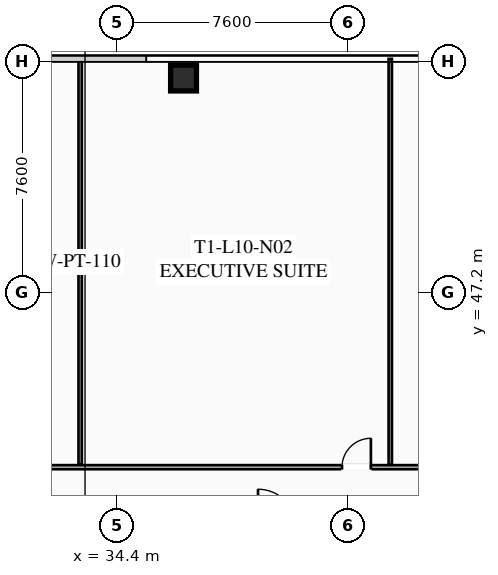
"""IFC4 building model, lengths in metres.
Left out: names, types, materials, properties, quantities, classifications, styles, units other than length and angle.
Written with IfcOpenShell. Run it as: python <this file> out.ifc"""

import sys

from ifc_helpers import new_model, si_unit, direction, frame, frame_2d, origin, origin_2d, place, context, subcontext, project, spatial, rectangle, hollow_rectangle, extrude, element, fill, save


model = new_model("IFC4")
c1 = context("Model", 3, precision=1e-05, world=origin(), true_north=direction((0.0, 1.0)))
c2 = subcontext(c1, "Body", "Model", "MODEL_VIEW")
j1 = project(units=[si_unit("LENGTHUNIT", "METRE"), si_unit("PLANEANGLEUNIT", "RADIAN")], contexts=[c1])
p1 = place(None, origin())
s1 = spatial("IfcSite", under=j1, at=p1, CompositionType="ELEMENT")
p2 = place(p1, origin())
s2 = spatial("IfcBuilding", under=s1, at=p2, CompositionType="ELEMENT")
p3 = place(p2, frame((0.0, 0.0, 42.35)))
s3 = spatial("IfcBuildingStorey", under=s2, at=p3, CompositionType="ELEMENT", Elevation=42.35)
p4 = place(p3, frame((36.6, 54.25, 0.0), z_axis=(0.0, 0.0, 1.0), x_axis=(1.0, 0.0, 0.0)))
e1 = element("IfcColumn", 1, at=p4, inside=s3, PredefinedType="COLUMN", context=c2, shape_type="SweptSolid", body=[
    extrude(hollow_rectangle(XDim=0.85, YDim=0.85, WallThickness=0.035, at=origin_2d()), origin(), (0.0, 0.0, 1.0), 3.35),
])
p5 = place(p3, frame((22.35, 41.45, 0.0), z_axis=(0.0, 0.0, 1.0), x_axis=(1.0, 0.0, 0.0)))
e2 = element("IfcWall", 2, at=p5, inside=s3, PredefinedType="PARTITIONING", context=c2, shape_type="SweptSolid", body=[
    extrude(rectangle(XDim=30.9, YDim=0.135, at=frame_2d((15.45, 0.0))), origin(), (0.0, 0.0, 1.0), 2.703),
])
p6 = place(p5, frame((0.3, 0.0, 0.0)))
e3 = element("IfcOpeningElement", 3, at=p6, cuts=e2, PredefinedType="OPENING", context=c2, shape_type="SweptSolid", body=[
    extrude(rectangle(XDim=0.95, YDim=2.05, at=frame_2d((0.475, 1.025))), frame((0.0, 0.077, 0.0), z_axis=(0.0, -1.0, 0.0), x_axis=(1.0, 0.0, 0.0)), (0.0, 0.0, 1.0), 0.155),
])
p7 = place(p5, frame((19.463, 0.0, 0.0)))
e4 = element("IfcOpeningElement", 4, at=p7, cuts=e2, PredefinedType="OPENING", context=c2, shape_type="SweptSolid", body=[
    extrude(rectangle(XDim=0.95, YDim=2.05, at=frame_2d((0.475, 1.025))), frame((0.0, 0.077, 0.0), z_axis=(0.0, -1.0, 0.0), x_axis=(1.0, 0.0, 0.0)), (0.0, 0.0, 1.0), 0.155),
])
p8 = place(p5, frame((29.65, 0.0, 0.0)))
e5 = element("IfcOpeningElement", 5, at=p8, cuts=e2, PredefinedType="OPENING", context=c2, shape_type="SweptSolid", body=[
    extrude(rectangle(XDim=0.95, YDim=2.05, at=frame_2d((0.475, 1.025))), frame((0.0, 0.077, 0.0), z_axis=(0.0, -1.0, 0.0), x_axis=(1.0, 0.0, 0.0)), (0.0, 0.0, 1.0), 0.155),
])
for number, where, z_axis, x_axis in (
    (6, (33.2, 41.53, 0.0), (0.0, 0.0, 1.0), (0.0, 1.0, 0.0)),
    (7, (43.4, 41.53, 0.0), (0.0, 0.0, 1.0), (0.0, 1.0, 0.0)),
):
    element("IfcWall", number, at=place(p3, frame(where, z_axis=z_axis, x_axis=x_axis)), inside=s3, PredefinedType="PARTITIONING", context=c2, shape_type="SweptSolid", body=[
        extrude(rectangle(XDim=13.35, YDim=0.11, at=frame_2d((6.675, 0.0))), origin(), (0.0, 0.0, 1.0), 2.703),
    ])
p9 = place(p7, origin())
e8 = element("IfcDoor", 8, at=p9, inside=s3, OperationType="SINGLE_SWING_RIGHT", PredefinedType="DOOR", context=c2, shape_type="SweptSolid", body=[
    extrude(rectangle(XDim=0.95, YDim=2.05, at=frame_2d((0.475, 1.025))), frame((0.0, 0.025, 0.0), z_axis=(0.0, -1.0, 0.0), x_axis=(1.0, 0.0, 0.0)), (0.0, 0.0, 1.0), 0.05),
])
fill(e4, e8)
save(model, sys.argv[1])
